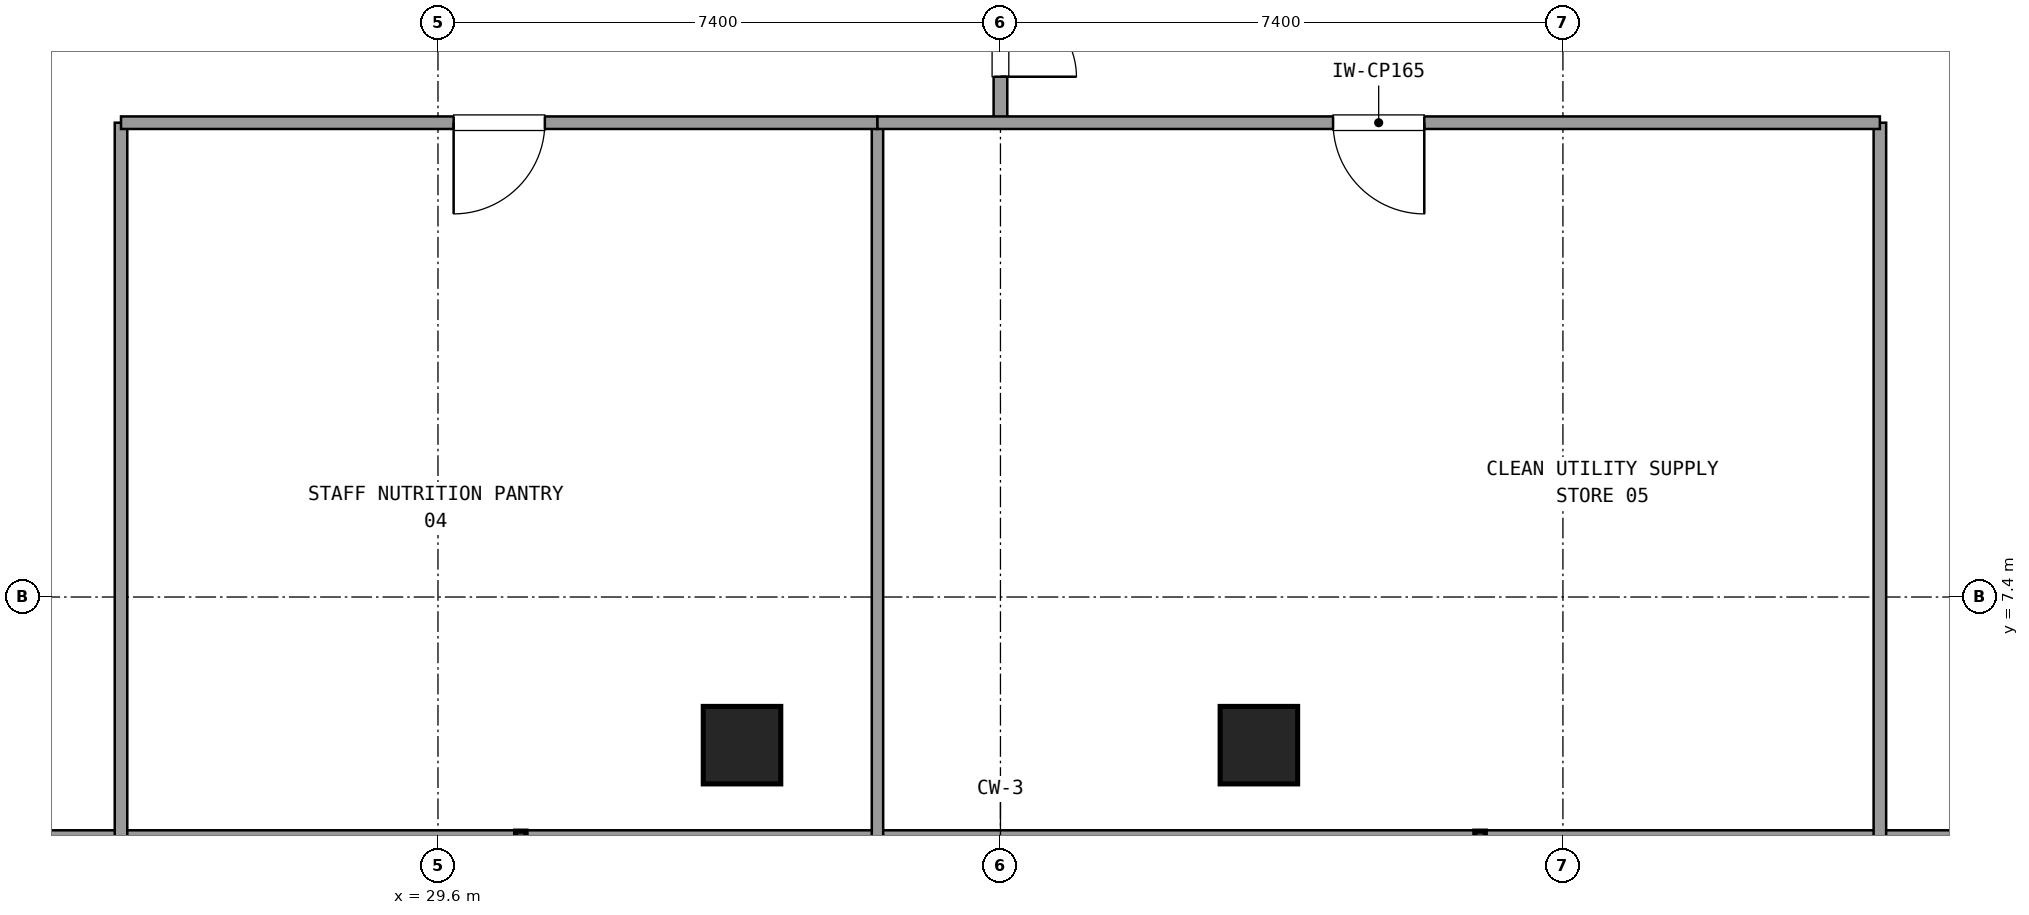
"""IFC4 building model, lengths in metres.
Left out: names, types, materials, properties, quantities, classifications, styles, units other than length and angle.
Written with IfcOpenShell. Run it as: python <this file> out.ifc"""

import sys

from ifc_helpers import new_model, si_unit, direction, frame, frame_2d, origin, origin_2d, place, context, subcontext, project, spatial, rectangle, extrude, element, fill, save


model = new_model("IFC4")
c1 = context("Model", 3, precision=1e-05, world=origin(), true_north=direction((0.0, 1.0)))
c2 = subcontext(c1, "Body", "Model", "MODEL_VIEW")
j1 = project(units=[si_unit("LENGTHUNIT", "METRE"), si_unit("PLANEANGLEUNIT", "RADIAN")], contexts=[c1])
p1 = place(None, origin())
s1 = spatial("IfcSite", under=j1, at=p1, CompositionType="ELEMENT")
p2 = place(p1, origin())
s2 = spatial("IfcBuilding", under=s1, at=p2, CompositionType="ELEMENT")
p3 = place(p2, frame((0.0, 0.0, 109.98)))
s3 = spatial("IfcBuildingStorey", under=s2, at=p3, CompositionType="ELEMENT", Elevation=109.98)
for number, where, z_axis, x_axis in (
    (1, (33.6, 5.451, 0.021), (0.0, 0.025, 1.0), (-1.0, 0.0, 0.0)),
    (2, (40.4, 5.451, 0.021), (0.0, 0.025, 1.0), (-1.0, 0.0, 0.0)),
):
    element("IfcColumn", number, at=place(p3, frame(where, z_axis=z_axis, x_axis=x_axis)), inside=s3, PredefinedType="COLUMN", context=c2, shape_type="SweptSolid", body=[
        extrude(rectangle(XDim=1.02, YDim=1.02, at=origin_2d()), origin(), (0.0, 0.0, 1.0), 3.559),
    ])
p4 = place(p3, frame((18.069, 4.211, 0.0), z_axis=(0.0, 0.0, 1.0), x_axis=(1.0, 0.0, 0.0)))
e3 = element("IfcWall", 3, at=p4, inside=s3, PredefinedType="SOLIDWALL", context=c2, shape_type="SweptSolid", body=[
    extrude(rectangle(XDim=37.862, YDim=0.24, at=frame_2d((18.931, 0.0))), origin(), (0.0, 0.0, 1.0), 0.85),
])
p5 = place(p3, frame((37.0, 13.64, 0.0), z_axis=(0.0, 0.0, 1.0), x_axis=(0.0, 1.0, 0.0)))
e4 = element("IfcWall", 4, at=p5, inside=s3, PredefinedType="PARTITIONING", context=c2, shape_type="SweptSolid", body=[
    extrude(rectangle(XDim=3.21, YDim=0.18, at=frame_2d((1.605, 0.0))), origin(), (0.0, 0.0, 1.0), 2.61),
])
p6 = place(p5, frame((0.605, 0.0, 0.0)))
e5 = element("IfcOpeningElement", 5, at=p6, cuts=e4, PredefinedType="OPENING", context=c2, shape_type="SweptSolid", body=[
    extrude(rectangle(XDim=2.0, YDim=2.2, at=frame_2d((1.0, 1.1))), frame((0.0, 0.1, 0.0), z_axis=(0.0, -1.0, 0.0), x_axis=(1.0, 0.0, 0.0)), (0.0, 0.0, 1.0), 0.2),
])
for number, where, z_axis, x_axis in (
    (6, (25.43, 4.231, 0.0), (0.0, 0.0, 1.0), (0.0, 1.0, 0.0)),
    (7, (48.57, 4.231, 0.0), (0.0, 0.0, 1.0), (0.0, 1.0, 0.0)),
):
    element("IfcWall", number, at=place(p3, frame(where, z_axis=z_axis, x_axis=x_axis)), inside=s3, PredefinedType="PARTITIONING", context=c2, shape_type="SweptSolid", body=[
        extrude(rectangle(XDim=9.409, YDim=0.165, at=frame_2d((4.705, 0.0))), origin(), (0.0, 0.0, 1.0), 2.61),
    ])
p7 = place(p3, frame((35.382, 13.64, 0.0), z_axis=(0.0, 0.0, 1.0), x_axis=(0.0, -1.0, 0.0)))
e8 = element("IfcWall", 8, at=p7, inside=s3, PredefinedType="PARTITIONING", context=c2, shape_type="SweptSolid", body=[
    extrude(rectangle(XDim=9.409, YDim=0.15, at=frame_2d((4.705, 0.0))), origin(), (0.0, 0.0, 1.0), 2.61),
])
p8 = place(p3, frame((25.43, 13.64, 0.0), z_axis=(0.0, 0.0, 1.0), x_axis=(1.0, 0.0, 0.0)))
e9 = element("IfcWall", 9, at=p8, inside=s3, PredefinedType="PARTITIONING", context=c2, shape_type="SweptSolid", body=[
    extrude(rectangle(XDim=9.952, YDim=0.165, at=frame_2d((4.976, 0.0))), origin(), (0.0, 0.0, 1.0), 2.61),
])
p9 = place(p8, frame((4.376, 0.0, 0.0)))
e10 = element("IfcOpeningElement", 10, at=p9, cuts=e9, PredefinedType="OPENING", context=c2, shape_type="SweptSolid", body=[
    extrude(rectangle(XDim=1.2, YDim=2.15, at=frame_2d((0.6, 1.075))), frame((0.0, 0.093, 0.0), z_axis=(0.0, -1.0, 0.0), x_axis=(1.0, 0.0, 0.0)), (0.0, 0.0, 1.0), 0.185),
])
p10 = place(p3, frame((35.382, 13.64, 0.0), z_axis=(0.0, 0.0, 1.0), x_axis=(1.0, 0.0, 0.0)))
e11 = element("IfcWall", 11, at=p10, inside=s3, PredefinedType="PARTITIONING", context=c2, shape_type="SweptSolid", body=[
    extrude(rectangle(XDim=13.188, YDim=0.165, at=frame_2d((6.594, 0.0))), origin(), (0.0, 0.0, 1.0), 2.61),
])
p11 = place(p10, frame((5.994, 0.0, 0.0)))
e12 = element("IfcOpeningElement", 12, at=p11, cuts=e11, PredefinedType="OPENING", context=c2, shape_type="SweptSolid", body=[
    extrude(rectangle(XDim=1.2, YDim=2.15, at=frame_2d((0.6, 1.075))), frame((0.0, 0.093, 0.0), z_axis=(0.0, -1.0, 0.0), x_axis=(1.0, 0.0, 0.0)), (0.0, 0.0, 1.0), 0.185),
])
p12 = place(p6, frame((2.0, 0.0, 0.0), z_axis=(0.0, 0.0, 1.0), x_axis=(-1.0, 0.0, 0.0)))
e13 = element("IfcDoor", 13, at=p12, inside=s3, OperationType="DOUBLE_DOOR_SINGLE_SWING", PredefinedType="DOOR", context=c2, shape_type="SweptSolid", body=[
    extrude(rectangle(XDim=2.0, YDim=2.2, at=frame_2d((1.0, 1.1))), frame((0.0, 0.025, 0.0), z_axis=(0.0, -1.0, 0.0), x_axis=(1.0, 0.0, 0.0)), (0.0, 0.0, 1.0), 0.05),
])
fill(e5, e13)
p13 = place(p9, frame((1.2, 0.0, 0.0), z_axis=(0.0, 0.0, 1.0), x_axis=(-1.0, 0.0, 0.0)))
e14 = element("IfcDoor", 14, at=p13, inside=s3, OperationType="SINGLE_SWING_LEFT", PredefinedType="DOOR", context=c2, shape_type="SweptSolid", body=[
    extrude(rectangle(XDim=1.2, YDim=2.15, at=frame_2d((0.6, 1.075))), frame((0.0, 0.025, 0.0), z_axis=(0.0, -1.0, 0.0), x_axis=(1.0, 0.0, 0.0)), (0.0, 0.0, 1.0), 0.05),
])
fill(e10, e14)
p14 = place(p11, frame((1.2, 0.0, 0.0), z_axis=(0.0, 0.0, 1.0), x_axis=(-1.0, 0.0, 0.0)))
e15 = element("IfcDoor", 15, at=p14, inside=s3, OperationType="SINGLE_SWING_RIGHT", PredefinedType="DOOR", context=c2, shape_type="SweptSolid", body=[
    extrude(rectangle(XDim=1.2, YDim=2.15, at=frame_2d((0.6, 1.075))), frame((0.0, 0.025, 0.0), z_axis=(0.0, -1.0, 0.0), x_axis=(1.0, 0.0, 0.0)), (0.0, 0.0, 1.0), 0.05),
])
fill(e12, e15)
save(model, sys.argv[1])
